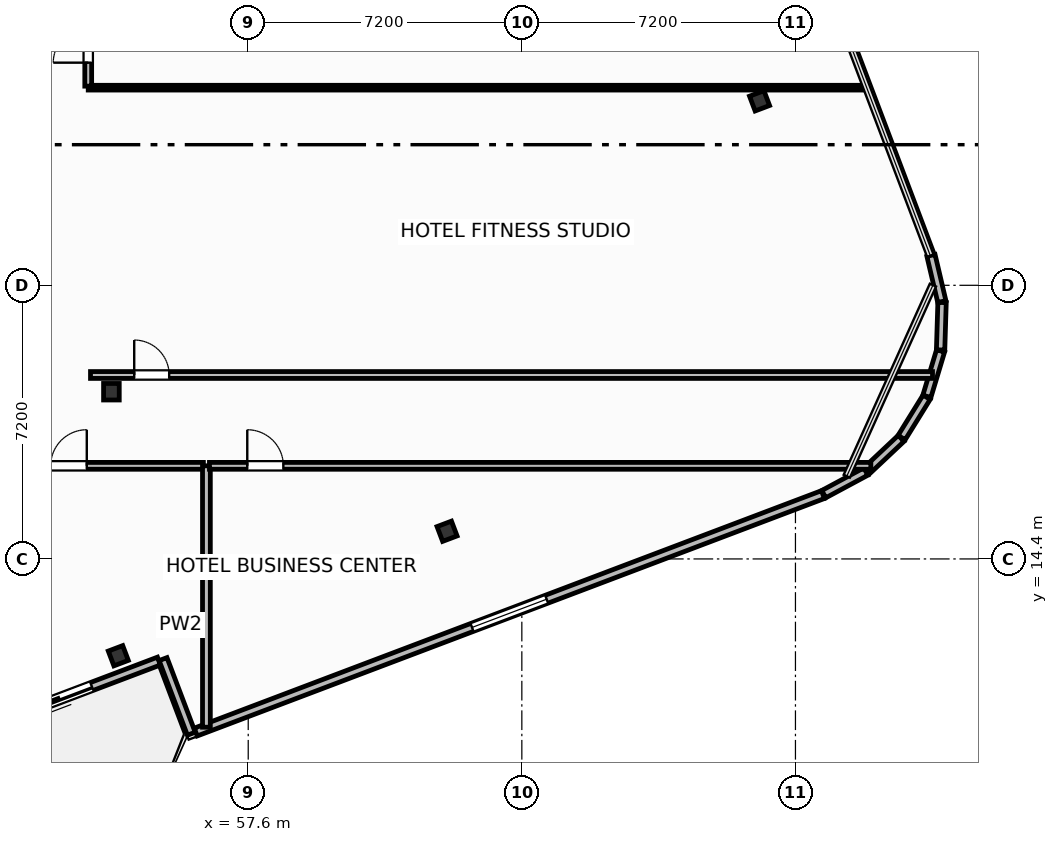
"""IFC4 building model, lengths in metres.
Left out: names, types, materials, properties, quantities, classifications, styles, units other than length and angle.
Written with IfcOpenShell. Run it as: python <this file> out.ifc"""

import sys

from ifc_helpers import new_model, si_unit, direction, frame, frame_2d, origin, origin_2d, place, context, subcontext, project, spatial, rectangle, i_section, extrude, element, fill, save


model = new_model("IFC4")
c1 = context("Model", 3, precision=1e-05, world=origin(), true_north=direction((0.0, 1.0)))
c2 = subcontext(c1, "Body", "Model", "MODEL_VIEW")
j1 = project(units=[si_unit("LENGTHUNIT", "METRE"), si_unit("PLANEANGLEUNIT", "RADIAN")], contexts=[c1])
p1 = place(None, origin())
s1 = spatial("IfcSite", under=j1, at=p1, CompositionType="ELEMENT")
p2 = place(p1, origin())
s2 = spatial("IfcBuilding", under=s1, at=p2, CompositionType="ELEMENT")
p3 = place(p2, frame((0.0, 0.0, 242.3)))
s3 = spatial("IfcBuildingStorey", under=s2, at=p3, CompositionType="ELEMENT", Elevation=242.3)
p4 = place(p3, frame((54.0, 18.8, 0.0), z_axis=(0.0, 0.0, 1.0), x_axis=(1.0, 0.0, 0.0)))
e1 = element("IfcColumn", 1, at=p4, inside=s3, PredefinedType="COLUMN", context=c2, shape_type="SweptSolid", body=[
    extrude(i_section(OverallWidth=0.412, OverallDepth=0.435, WebThickness=0.036, FlangeThickness=0.057, FilletRadius=0.025, at=origin_2d()), origin(), (0.0, 0.0, 1.0), 3.7),
])
for number, where, z_axis, x_axis in (
    (2, (54.181, 11.853, 0.0), (0.0, 0.0, 1.0), (0.935, 0.354, 0.0)),
    (3, (62.832, 15.128, 0.0), (0.0, 0.0, 1.0), (0.935, 0.354, 0.0)),
    (4, (71.055, 26.453, 0.0), (0.0, 0.0, 1.0), (0.935, 0.354, 0.0)),
):
    element("IfcColumn", number, at=place(p3, frame(where, z_axis=z_axis, x_axis=x_axis)), inside=s3, PredefinedType="COLUMN", context=c2, shape_type="SweptSolid", body=[
        extrude(i_section(OverallWidth=0.406, OverallDepth=0.416, WebThickness=0.03, FlangeThickness=0.048, FilletRadius=0.025, at=origin_2d()), origin(), (0.0, 0.0, 1.0), 3.7),
    ])
p5 = place(p3, frame((55.25, 11.713, 0.0), z_axis=(0.0, 0.0, 1.0), x_axis=(-0.935227640088, -0.354046976001, 0.0)))
e5 = element("IfcWall", 5, at=p5, inside=s3, PredefinedType="SOLIDWALL", context=c2, shape_type="SweptSolid", body=[
    extrude(rectangle(XDim=6.0, YDim=0.22, at=frame_2d((3.0, 0.0))), origin(), (0.0, 0.0, 1.0), 2.73),
])
p6 = place(p5, frame((1.888, 0.0, 0.0)))
e6 = element("IfcOpeningElement", 6, at=p6, cuts=e5, PredefinedType="OPENING", context=c2, shape_type="SweptSolid", body=[
    extrude(rectangle(XDim=2.1, YDim=2.3, at=frame_2d((1.05, 1.15))), frame((0.0, 0.12, 0.0), z_axis=(0.0, -1.0, 0.0), x_axis=(1.0, 0.0, 0.0)), (0.0, 0.0, 1.0), 0.24),
])
p7 = place(p3, frame((55.359, 11.764, 0.0), z_axis=(0.0, 0.0, 1.0), x_axis=(0.354026782794, -0.935235284334, 0.0)))
e7 = element("IfcWall", 7, at=p7, inside=s3, PredefinedType="SOLIDWALL", context=c2, shape_type="SweptSolid", body=[
    extrude(rectangle(XDim=2.1, YDim=0.22, at=frame_2d((1.05, 0.0))), origin(), (0.0, 0.0, 1.0), 2.73),
])
p8 = place(p3, frame((56.219, 9.845, 0.0), z_axis=(0.0, 0.0, 1.0), x_axis=(0.935225601791, 0.354052360188, 0.0)))
e8 = element("IfcWall", 8, at=p8, inside=s3, PredefinedType="SOLIDWALL", context=c2, shape_type="SweptSolid", body=[
    extrude(rectangle(XDim=17.647, YDim=0.22, at=frame_2d((8.824, 0.0))), origin(), (0.0, 0.0, 1.0), 2.73),
])
p9 = place(p8, frame((7.774, 0.0, 0.8)))
e9 = element("IfcOpeningElement", 9, at=p9, cuts=e8, PredefinedType="OPENING", context=c2, shape_type="SweptSolid", body=[
    extrude(rectangle(XDim=2.1, YDim=1.75, at=frame_2d((1.05, 0.875))), frame((0.0, 0.12, 0.0), z_axis=(0.0, -1.0, 0.0), x_axis=(1.0, 0.0, 0.0)), (0.0, 0.0, 1.0), 0.24),
])
p10 = place(p3, frame((72.746, 16.105, 0.0), z_axis=(0.0, 0.0, 1.0), x_axis=(0.881112879796, 0.472906008693, 0.0)))
e10 = element("IfcWall", 10, at=p10, inside=s3, PredefinedType="SOLIDWALL", context=c2, shape_type="SweptSolid", body=[
    extrude(rectangle(XDim=1.257, YDim=0.22, at=frame_2d((0.628, 0.0))), origin(), (0.0, 0.0, 1.0), 2.73),
])
p11 = place(p3, frame((73.871, 16.717, 0.0), z_axis=(0.0, 0.0, 1.0), x_axis=(0.728475443486, 0.685071914647, 0.0)))
e11 = element("IfcWall", 11, at=p11, inside=s3, PredefinedType="SOLIDWALL", context=c2, shape_type="SweptSolid", body=[
    extrude(rectangle(XDim=1.249, YDim=0.22, at=frame_2d((0.625, 0.0))), origin(), (0.0, 0.0, 1.0), 2.73),
])
for number, where, z_axis, x_axis in (
    (12, (74.794, 17.593, 0.0), (0.0, 0.0, 1.0), (0.527, 0.85, 0.0)),
    (13, (75.458, 18.679, 0.0), (0.0, 0.0, 1.0), (0.288, 0.958, 0.0)),
):
    element("IfcWall", number, at=place(p3, frame(where, z_axis=z_axis, x_axis=x_axis)), inside=s3, PredefinedType="SOLIDWALL", context=c2, shape_type="SweptSolid", body=[
        extrude(rectangle(XDim=1.249, YDim=0.22, at=frame_2d((0.624, 0.0))), origin(), (0.0, 0.0, 1.0), 2.73),
    ])
p12 = place(p3, frame((75.819, 19.899, 0.0), z_axis=(0.0, 0.0, 1.0), x_axis=(0.030898954628, 0.999522513305, 0.0)))
e14 = element("IfcWall", 14, at=p12, inside=s3, PredefinedType="SOLIDWALL", context=c2, shape_type="SweptSolid", body=[
    extrude(rectangle(XDim=1.248, YDim=0.22, at=frame_2d((0.624, 0.0))), origin(), (0.0, 0.0, 1.0), 2.73),
])
p13 = place(p3, frame((75.852, 21.172, 0.0), z_axis=(0.0, 0.0, 1.0), x_axis=(-0.228941257463, 0.973440239887, 0.0)))
e15 = element("IfcWall", 15, at=p13, inside=s3, PredefinedType="SOLIDWALL", context=c2, shape_type="SweptSolid", body=[
    extrude(rectangle(XDim=1.249, YDim=0.22, at=frame_2d((0.625, 0.0))), origin(), (0.0, 0.0, 1.0), 2.73),
])
p14 = place(p3, frame((49.08, 16.85, 0.0), z_axis=(0.0, 0.0, 1.0), x_axis=(1.0, 0.0, 0.0)))
e16 = element("IfcWall", 16, at=p14, inside=s3, PredefinedType="PARTITIONING", context=c2, shape_type="SweptSolid", body=[
    extrude(rectangle(XDim=7.34, YDim=0.18, at=frame_2d((3.67, 0.0))), origin(), (0.0, 0.0, 1.0), 3.45),
])
p15 = place(p14, frame((3.322, 0.0, 0.0)))
e17 = element("IfcOpeningElement", 17, at=p15, cuts=e16, PredefinedType="OPENING", context=c2, shape_type="SweptSolid", body=[
    extrude(rectangle(XDim=0.95, YDim=2.15, at=frame_2d((0.475, 1.075))), frame((0.0, 0.1, 0.0), z_axis=(0.0, -1.0, 0.0), x_axis=(1.0, 0.0, 0.0)), (0.0, 0.0, 1.0), 0.2),
])
p16 = place(p3, frame((56.5, 9.972, 0.0), z_axis=(0.0, 0.0, 1.0), x_axis=(0.0, 1.0, 0.0)))
e18 = element("IfcWall", 18, at=p16, inside=s3, PredefinedType="PARTITIONING", context=c2, shape_type="SweptSolid", body=[
    extrude(rectangle(XDim=6.878, YDim=0.205, at=frame_2d((3.439, 0.0))), origin(), (0.0, 0.0, 1.0), 3.45),
])
p17 = place(p3, frame((56.58, 16.85, 0.0), z_axis=(0.0, 0.0, 1.0), x_axis=(1.0, 0.0, 0.0)))
e19 = element("IfcWall", 19, at=p17, inside=s3, PredefinedType="PARTITIONING", context=c2, shape_type="SweptSolid", body=[
    extrude(rectangle(XDim=17.404, YDim=0.18, at=frame_2d((8.702, 0.0))), origin(), (0.0, 0.0, 1.0), 3.45),
])
p18 = place(p17, frame((0.995, 0.0, 0.0)))
e20 = element("IfcOpeningElement", 20, at=p18, cuts=e19, PredefinedType="OPENING", context=c2, shape_type="SweptSolid", body=[
    extrude(rectangle(XDim=0.95, YDim=2.05, at=frame_2d((0.475, 1.025))), frame((0.0, 0.1, 0.0), z_axis=(0.0, -1.0, 0.0), x_axis=(1.0, 0.0, 0.0)), (0.0, 0.0, 1.0), 0.2),
])
p19 = place(p3, frame((53.45, 19.24, 0.0), z_axis=(0.0, 0.0, 1.0), x_axis=(1.0, 0.0, 0.0)))
e21 = element("IfcWall", 21, at=p19, inside=s3, PredefinedType="PARTITIONING", context=c2, shape_type="SweptSolid", body=[
    extrude(rectangle(XDim=22.156, YDim=0.18, at=frame_2d((11.078, 0.0))), origin(), (0.0, 0.0, 1.0), 3.45),
])
p20 = place(p19, frame((1.15, 0.0, 0.0)))
e22 = element("IfcOpeningElement", 22, at=p20, cuts=e21, PredefinedType="OPENING", context=c2, shape_type="SweptSolid", body=[
    extrude(rectangle(XDim=0.92, YDim=2.05, at=frame_2d((0.46, 1.025))), frame((0.0, 0.1, 0.0), z_axis=(0.0, -1.0, 0.0), x_axis=(1.0, 0.0, 0.0)), (0.0, 0.0, 1.0), 0.2),
])
p21 = place(p3, frame((53.39, 26.8, 0.0), z_axis=(0.0, 0.0, 1.0), x_axis=(1.0, 0.0, 0.0)))
e23 = element("IfcWall", 23, at=p21, inside=s3, PredefinedType="PARTITIONING", context=c2, shape_type="SweptSolid", body=[
    extrude(rectangle(XDim=20.445, YDim=0.125, at=frame_2d((10.223, 0.0))), origin(), (0.0, 0.0, 1.0), 2.739),
])
p22 = place(p3, frame((53.39, 26.84, 0.0), z_axis=(0.0, 0.0, 1.0), x_axis=(0.0, 1.0, 0.0)))
e24 = element("IfcWall", 24, at=p22, inside=s3, PredefinedType="PARTITIONING", context=c2, shape_type="SweptSolid", body=[
    extrude(rectangle(XDim=12.46, YDim=0.18, at=frame_2d((6.23, 0.0))), origin(), (0.0, 0.0, 1.0), 3.45),
])
p23 = place(p22, frame((0.618, 0.0, 0.0)))
e25 = element("IfcOpeningElement", 25, at=p23, cuts=e24, PredefinedType="OPENING", context=c2, shape_type="SweptSolid", body=[
    extrude(rectangle(XDim=0.92, YDim=2.05, at=frame_2d((0.46, 1.025))), frame((0.0, 0.1, 0.0), z_axis=(0.0, -1.0, 0.0), x_axis=(1.0, 0.0, 0.0)), (0.0, 0.0, 1.0), 0.2),
])
p24 = place(p6, origin())
e26 = element("IfcDoor", 26, at=p24, inside=s3, OperationType="SLIDING_TO_LEFT", PredefinedType="DOOR", context=c2, shape_type="SweptSolid", body=[
    extrude(rectangle(XDim=2.1, YDim=2.3, at=frame_2d((1.05, 1.15))), frame((0.0, 0.025, 0.0), z_axis=(0.0, -1.0, 0.0), x_axis=(1.0, 0.0, 0.0)), (0.0, 0.0, 1.0), 0.05),
])
fill(e6, e26)
p25 = place(p9, origin())
e27 = element("IfcWindow", 27, at=p25, inside=s3, PartitioningType="SINGLE_PANEL", PredefinedType="WINDOW", context=c2, shape_type="SweptSolid", body=[
    extrude(rectangle(XDim=2.1, YDim=1.75, at=frame_2d((1.05, 0.875))), frame((0.0, 0.03, 0.0), z_axis=(0.0, -1.0, 0.0), x_axis=(1.0, 0.0, 0.0)), (0.0, 0.0, 1.0), 0.06),
])
fill(e9, e27)
p26 = place(p15, origin())
e28 = element("IfcDoor", 28, at=p26, inside=s3, OperationType="SINGLE_SWING_RIGHT", PredefinedType="DOOR", context=c2, shape_type="SweptSolid", body=[
    extrude(rectangle(XDim=0.95, YDim=2.15, at=frame_2d((0.475, 1.075))), frame((0.0, 0.025, 0.0), z_axis=(0.0, -1.0, 0.0), x_axis=(1.0, 0.0, 0.0)), (0.0, 0.0, 1.0), 0.05),
])
fill(e17, e28)
p27 = place(p18, origin())
e29 = element("IfcDoor", 29, at=p27, inside=s3, OperationType="SINGLE_SWING_LEFT", PredefinedType="DOOR", context=c2, shape_type="SweptSolid", body=[
    extrude(rectangle(XDim=0.95, YDim=2.05, at=frame_2d((0.475, 1.025))), frame((0.0, 0.025, 0.0), z_axis=(0.0, -1.0, 0.0), x_axis=(1.0, 0.0, 0.0)), (0.0, 0.0, 1.0), 0.05),
])
fill(e20, e29)
p28 = place(p20, origin())
e30 = element("IfcDoor", 30, at=p28, inside=s3, OperationType="SINGLE_SWING_LEFT", PredefinedType="DOOR", context=c2, shape_type="SweptSolid", body=[
    extrude(rectangle(XDim=0.92, YDim=2.05, at=frame_2d((0.46, 1.025))), frame((0.0, 0.025, 0.0), z_axis=(0.0, -1.0, 0.0), x_axis=(1.0, 0.0, 0.0)), (0.0, 0.0, 1.0), 0.05),
])
fill(e22, e30)
p29 = place(p23, origin())
e31 = element("IfcDoor", 31, at=p29, inside=s3, OperationType="SINGLE_SWING_LEFT", PredefinedType="DOOR", context=c2, shape_type="SweptSolid", body=[
    extrude(rectangle(XDim=0.92, YDim=2.05, at=frame_2d((0.46, 1.025))), frame((0.0, 0.025, 0.0), z_axis=(0.0, -1.0, 0.0), x_axis=(1.0, 0.0, 0.0)), (0.0, 0.0, 1.0), 0.05),
])
fill(e25, e31)
save(model, sys.argv[1])
